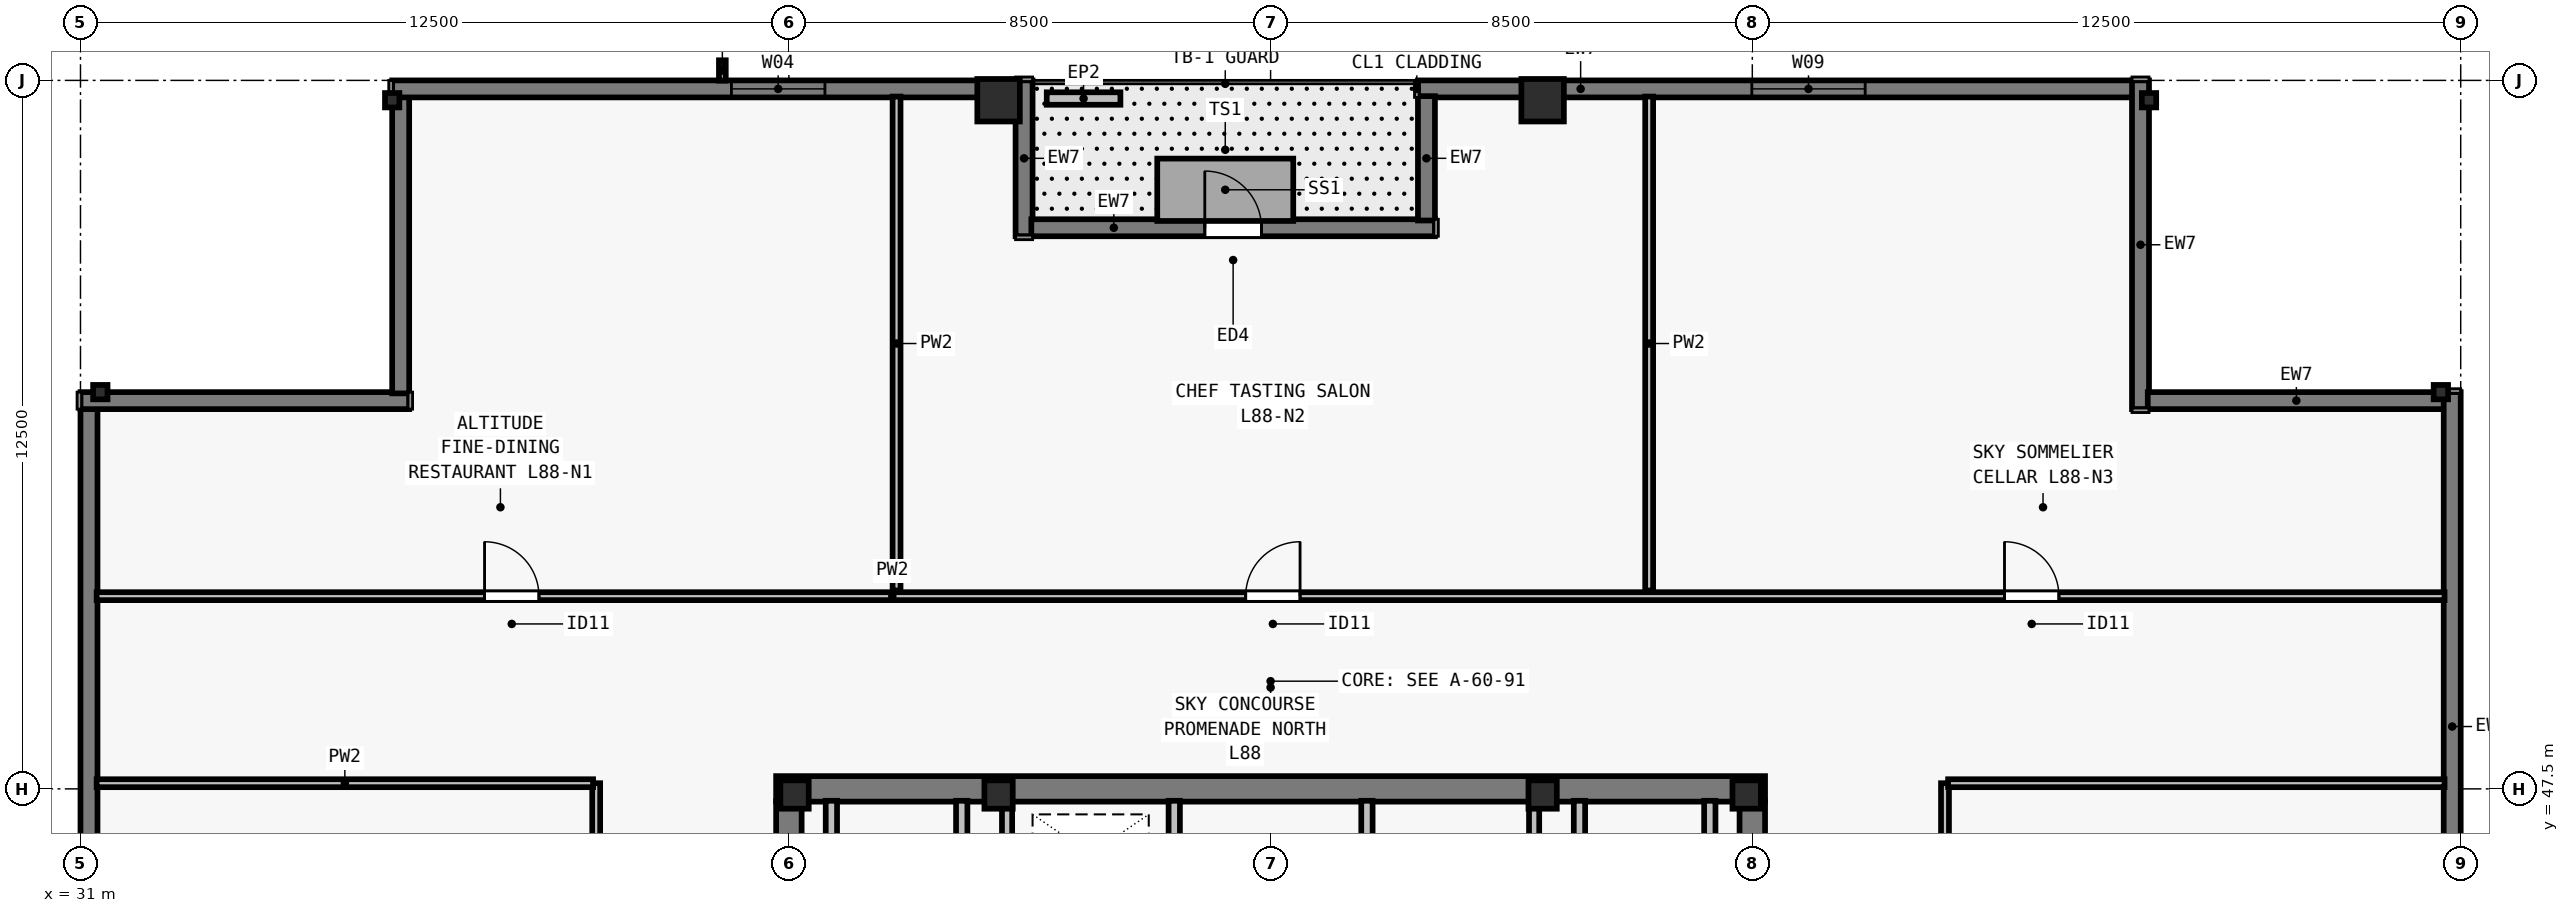
"""IFC4 building model, lengths in metres.
Left out: names, types, materials, properties, quantities, classifications, styles, units other than length and angle.
Written with IfcOpenShell. Run it as: python <this file> out.ifc"""

import sys

from ifc_helpers import new_model, si_unit, direction, frame, frame_2d, origin, origin_2d, place, context, subcontext, project, spatial, rectangle, i_section, extrude, element, fill, save


model = new_model("IFC4")
c1 = context("Model", 3, precision=1e-05, world=origin(), true_north=direction((0.0, 1.0)))
c2 = subcontext(c1, "Body", "Model", "MODEL_VIEW")
j1 = project(units=[si_unit("LENGTHUNIT", "METRE"), si_unit("PLANEANGLEUNIT", "RADIAN")], contexts=[c1])
p1 = place(None, origin())
s1 = spatial("IfcSite", under=j1, at=p1, CompositionType="ELEMENT")
p2 = place(p1, origin())
s2 = spatial("IfcBuilding", under=s1, at=p2, CompositionType="ELEMENT")
p3 = place(p2, frame((0.0, 0.0, 320.0)))
s3 = spatial("IfcBuildingStorey", under=s2, at=p3, CompositionType="ELEMENT", Elevation=320.0)
for number, where, z_axis, x_axis in (
    (1, (43.6, 47.4, 0.0), (0.0, 0.0, 1.0), (1.0, 0.0, 0.0)),
    (2, (47.2, 47.4, 0.0), (0.0, 0.0, 1.0), (1.0, 0.0, 0.0)),
    (3, (56.8, 47.4, 0.0), (0.0, 0.0, 1.0), (1.0, 0.0, 0.0)),
    (4, (60.4, 47.4, 0.0), (0.0, 0.0, 1.0), (1.0, 0.0, 0.0)),
):
    element("IfcColumn", number, at=place(p3, frame(where, z_axis=z_axis, x_axis=x_axis)), inside=s3, PredefinedType="COLUMN", context=c2, shape_type="SweptSolid", body=[
        extrude(i_section(OverallWidth=0.5, OverallDepth=0.5, WebThickness=0.028, FlangeThickness=0.045, at=origin_2d()), origin(), (0.0, 0.0, 1.0), 4.5),
    ])
for number, where, z_axis, x_axis in (
    (5, (72.65, 54.5, 0.0), (0.0, 0.0, 1.0), (0.0, 1.0, 0.0)),
    (6, (67.5, 59.65, 0.0), (0.0, 0.0, 1.0), (1.0, 0.0, 0.0)),
):
    element("IfcColumn", number, at=place(p3, frame(where, z_axis=z_axis, x_axis=x_axis)), inside=s3, PredefinedType="COLUMN", context=c2, shape_type="SweptSolid", body=[
        extrude(i_section(OverallWidth=0.254, OverallDepth=0.254, WebThickness=0.009, FlangeThickness=0.014, FilletRadius=0.013, at=origin_2d()), origin(), (0.0, 0.0, 1.0), 4.5),
    ])
for number, where, z_axis, x_axis in (
    (7, (56.8, 59.65, 0.0), (0.0, 0.0, 1.0), (1.0, 0.0, 0.0)),
    (8, (47.2, 59.65, 0.0), (0.0, 0.0, 1.0), (1.0, 0.0, 0.0)),
):
    element("IfcColumn", number, at=place(p3, frame(where, z_axis=z_axis, x_axis=x_axis)), inside=s3, PredefinedType="COLUMN", context=c2, shape_type="SweptSolid", body=[
        extrude(rectangle(XDim=0.75, YDim=0.75, at=origin_2d()), origin(), (0.0, 0.0, 1.0), 4.5),
    ])
for number, where, z_axis, x_axis in (
    (9, (36.5, 59.65, 0.0), (0.0, 0.0, 1.0), (1.0, 0.0, 0.0)),
    (10, (31.35, 54.5, 0.0), (0.0, 0.0, 1.0), (0.0, 1.0, 0.0)),
):
    element("IfcColumn", number, at=place(p3, frame(where, z_axis=z_axis, x_axis=x_axis)), inside=s3, PredefinedType="COLUMN", context=c2, shape_type="SweptSolid", body=[
        extrude(i_section(OverallWidth=0.254, OverallDepth=0.254, WebThickness=0.009, FlangeThickness=0.014, FilletRadius=0.013, at=origin_2d()), origin(), (0.0, 0.0, 1.0), 4.5),
    ])
p4 = place(p3, frame((54.6, 59.85, 0.0), z_axis=(0.0, 0.0, 1.0), x_axis=(1.0, 0.0, 0.0)))
e11 = element("IfcWall", 11, at=p4, inside=s3, PredefinedType="SOLIDWALL", context=c2, shape_type="SweptSolid", body=[
    extrude(rectangle(XDim=12.622, YDim=0.3, at=frame_2d((6.311, 0.0))), origin(), (0.0, 0.0, 1.0), 4.25),
])
p5 = place(p4, frame((5.892, 0.0, 0.8)))
e12 = element("IfcOpeningElement", 12, at=p5, cuts=e11, PredefinedType="OPENING", context=c2, shape_type="SweptSolid", body=[
    extrude(rectangle(XDim=2.0, YDim=1.53, at=frame_2d((1.0, 0.765))), frame((0.0, 0.16, 0.0), z_axis=(0.0, -1.0, 0.0), x_axis=(1.0, 0.0, 0.0)), (0.0, 0.0, 1.0), 0.32),
])
p6 = place(p3, frame((67.35, 60.0, 0.0), z_axis=(0.0, 0.0, 1.0), x_axis=(0.0, -1.0, 0.0)))
e13 = element("IfcWall", 13, at=p6, inside=s3, PredefinedType="SOLIDWALL", context=c2, shape_type="SweptSolid", body=[
    extrude(rectangle(XDim=5.8, YDim=0.3, at=frame_2d((2.9, 0.0))), origin(), (0.0, 0.0, 1.0), 4.25),
])
p7 = place(p3, frame((67.478, 54.35, 0.0), z_axis=(0.0, 0.0, 1.0), x_axis=(1.0, 0.0, 0.0)))
e14 = element("IfcWall", 14, at=p7, inside=s3, PredefinedType="SOLIDWALL", context=c2, shape_type="SweptSolid", body=[
    extrude(rectangle(XDim=5.244, YDim=0.3, at=frame_2d((2.622, 0.0))), origin(), (0.0, 0.0, 1.0), 4.25),
])
p8 = place(p3, frame((72.85, 54.5, 0.0), z_axis=(0.0, 0.0, 1.0), x_axis=(0.0, -1.0, 0.0)))
e15 = element("IfcWall", 15, at=p8, inside=s3, PredefinedType="SOLIDWALL", context=c2, shape_type="SweptSolid", body=[
    extrude(rectangle(XDim=11.8, YDim=0.3, at=frame_2d((5.9, 0.0))), origin(), (0.0, 0.0, 1.0), 4.25),
])
p9 = place(p3, frame((31.15, 42.7, 0.0), z_axis=(0.0, 0.0, 1.0), x_axis=(0.0, 1.0, 0.0)))
e16 = element("IfcWall", 16, at=p9, inside=s3, PredefinedType="SOLIDWALL", context=c2, shape_type="SweptSolid", body=[
    extrude(rectangle(XDim=11.522, YDim=0.3, at=frame_2d((5.761, 0.0))), origin(), (0.0, 0.0, 1.0), 4.25),
])
p10 = place(p3, frame((31.0, 54.35, 0.0), z_axis=(0.0, 0.0, 1.0), x_axis=(1.0, 0.0, 0.0)))
e17 = element("IfcWall", 17, at=p10, inside=s3, PredefinedType="SOLIDWALL", context=c2, shape_type="SweptSolid", body=[
    extrude(rectangle(XDim=5.8, YDim=0.3, at=frame_2d((2.9, 0.0))), origin(), (0.0, 0.0, 1.0), 4.25),
])
p11 = place(p3, frame((36.65, 54.478, 0.0), z_axis=(0.0, 0.0, 1.0), x_axis=(0.0, 1.0, 0.0)))
e18 = element("IfcWall", 18, at=p11, inside=s3, PredefinedType="SOLIDWALL", context=c2, shape_type="SweptSolid", body=[
    extrude(rectangle(XDim=5.244, YDim=0.3, at=frame_2d((2.622, 0.0))), origin(), (0.0, 0.0, 1.0), 4.25),
])
p12 = place(p3, frame((36.5, 59.85, 0.0), z_axis=(0.0, 0.0, 1.0), x_axis=(1.0, 0.0, 0.0)))
e19 = element("IfcWall", 19, at=p12, inside=s3, PredefinedType="SOLIDWALL", context=c2, shape_type="SweptSolid", body=[
    extrude(rectangle(XDim=11.022, YDim=0.3, at=frame_2d((5.511, 0.0))), origin(), (0.0, 0.0, 1.0), 4.25),
])
p13 = place(p12, frame((5.986, 0.0, 0.8)))
e20 = element("IfcOpeningElement", 20, at=p13, cuts=e19, PredefinedType="OPENING", context=c2, shape_type="SweptSolid", body=[
    extrude(rectangle(XDim=1.65, YDim=1.53, at=frame_2d((0.825, 0.765))), frame((0.0, 0.16, 0.0), z_axis=(0.0, -1.0, 0.0), x_axis=(1.0, 0.0, 0.0)), (0.0, 0.0, 1.0), 0.32),
])
p14 = place(p3, frame((47.65, 60.0, 0.0), z_axis=(0.0, 0.0, 1.0), x_axis=(0.0, -1.0, 0.0)))
e21 = element("IfcWall", 21, at=p14, inside=s3, PredefinedType="SOLIDWALL", context=c2, shape_type="SweptSolid", body=[
    extrude(rectangle(XDim=2.75, YDim=0.3, at=frame_2d((1.375, 0.0))), origin(), (0.0, 0.0, 1.0), 4.25),
])
p15 = place(p3, frame((47.778, 57.4, 0.0), z_axis=(0.0, 0.0, 1.0), x_axis=(1.0, 0.0, 0.0)))
e22 = element("IfcWall", 22, at=p15, inside=s3, PredefinedType="SOLIDWALL", context=c2, shape_type="SweptSolid", body=[
    extrude(rectangle(XDim=7.122, YDim=0.3, at=frame_2d((3.561, 0.0))), origin(), (0.0, 0.0, 1.0), 4.25),
])
p16 = place(p15, frame((3.061, 0.0, 0.0)))
e23 = element("IfcOpeningElement", 23, at=p16, cuts=e22, PredefinedType="OPENING", context=c2, shape_type="SweptSolid", body=[
    extrude(rectangle(XDim=1.0, YDim=2.15, at=frame_2d((0.5, 1.075))), frame((0.0, 0.16, 0.0), z_axis=(0.0, -1.0, 0.0), x_axis=(1.0, 0.0, 0.0)), (0.0, 0.0, 1.0), 0.32),
])
p17 = place(p3, frame((54.75, 57.528, 0.0), z_axis=(0.0, 0.0, 1.0), x_axis=(0.0, 1.0, 0.0)))
e24 = element("IfcWall", 24, at=p17, inside=s3, PredefinedType="SOLIDWALL", context=c2, shape_type="SweptSolid", body=[
    extrude(rectangle(XDim=2.194, YDim=0.3, at=frame_2d((1.097, 0.0))), origin(), (0.0, 0.0, 1.0), 4.25),
])
p18 = place(p3, frame((48.05, 59.68, 0.0), z_axis=(0.0, 0.0, 1.0), x_axis=(1.0, 0.0, 0.0)))
e25 = element("IfcWall", 25, at=p18, inside=s3, PredefinedType="PARAPET", context=c2, shape_type="SweptSolid", body=[
    extrude(rectangle(XDim=1.3, YDim=0.22, at=frame_2d((0.65, 0.0))), origin(), (0.0, 0.0, 1.0), 0.55),
])
p19 = place(p3, frame((43.275, 47.5, 0.0), z_axis=(0.0, 0.0, 1.0), x_axis=(1.0, 0.0, 0.0)))
e26 = element("IfcWall", 26, at=p19, inside=s3, PredefinedType="SHEAR", context=c2, shape_type="SweptSolid", body=[
    extrude(rectangle(XDim=17.45, YDim=0.45, at=frame_2d((8.725, 0.0))), origin(), (0.0, 0.0, 1.0), 4.25),
])
for number, where, z_axis, x_axis in (
    (27, (43.5, 40.8, 0.0), (0.0, 0.0, 1.0), (0.0, 1.0, 0.0)),
    (28, (60.5, 40.8, 0.0), (0.0, 0.0, 1.0), (0.0, 1.0, 0.0)),
):
    element("IfcWall", number, at=place(p3, frame(where, z_axis=z_axis, x_axis=x_axis)), inside=s3, PredefinedType="SHEAR", context=c2, shape_type="SweptSolid", body=[
        extrude(rectangle(XDim=6.485, YDim=0.45, at=frame_2d((3.242, 0.0))), origin(), (0.0, 0.0, 1.0), 4.25),
    ])
p20 = place(p3, frame((50.3, 40.585, 0.0), z_axis=(0.0, 0.0, 1.0), x_axis=(0.0, 1.0, 0.0)))
e29 = element("IfcWall", 29, at=p20, inside=s3, PredefinedType="SOLIDWALL", context=c2, shape_type="SweptSolid", body=[
    extrude(rectangle(XDim=6.705, YDim=0.2, at=frame_2d((3.353, 0.0))), origin(), (0.0, 0.0, 1.0), 4.25),
])
p21 = place(p20, frame((0.515, 0.0, 0.0)))
e30 = element("IfcOpeningElement", 30, at=p21, cuts=e29, PredefinedType="OPENING", context=c2, shape_type="SweptSolid", body=[
    extrude(rectangle(XDim=1.1, YDim=2.2, at=frame_2d((0.55, 1.1))), frame((0.0, 0.11, 0.0), z_axis=(0.0, -1.0, 0.0), x_axis=(1.0, 0.0, 0.0)), (0.0, 0.0, 1.0), 0.22),
])
p22 = place(p20, frame((3.015, 0.0, 0.0)))
e31 = element("IfcOpeningElement", 31, at=p22, cuts=e29, PredefinedType="OPENING", context=c2, shape_type="SweptSolid", body=[
    extrude(rectangle(XDim=1.1, YDim=2.2, at=frame_2d((0.55, 1.1))), frame((0.0, 0.11, 0.0), z_axis=(0.0, -1.0, 0.0), x_axis=(1.0, 0.0, 0.0)), (0.0, 0.0, 1.0), 0.22),
])
p23 = place(p20, frame((5.065, 0.0, 0.0)))
e32 = element("IfcOpeningElement", 32, at=p23, cuts=e29, PredefinedType="OPENING", context=c2, shape_type="SweptSolid", body=[
    extrude(rectangle(XDim=0.8, YDim=2.08, at=frame_2d((0.4, 1.04))), frame((0.0, 0.11, 0.0), z_axis=(0.0, -1.0, 0.0), x_axis=(1.0, 0.0, 0.0)), (0.0, 0.0, 1.0), 0.22),
])
p24 = place(p3, frame((53.7, 40.585, 0.0), z_axis=(0.0, 0.0, 1.0), x_axis=(0.0, 1.0, 0.0)))
e33 = element("IfcWall", 33, at=p24, inside=s3, PredefinedType="SOLIDWALL", context=c2, shape_type="SweptSolid", body=[
    extrude(rectangle(XDim=6.705, YDim=0.2, at=frame_2d((3.353, 0.0))), origin(), (0.0, 0.0, 1.0), 4.25),
])
p25 = place(p24, frame((0.195, 0.0, 0.0)))
e34 = element("IfcOpeningElement", 34, at=p25, cuts=e33, PredefinedType="OPENING", context=c2, shape_type="SweptSolid", body=[
    extrude(rectangle(XDim=0.8, YDim=2.08, at=frame_2d((0.4, 1.04))), frame((0.0, 0.11, 0.0), z_axis=(0.0, -1.0, 0.0), x_axis=(1.0, 0.0, 0.0)), (0.0, 0.0, 1.0), 0.22),
])
p26 = place(p24, frame((1.865, 0.0, 0.0)))
e35 = element("IfcOpeningElement", 35, at=p26, cuts=e33, PredefinedType="OPENING", context=c2, shape_type="SweptSolid", body=[
    extrude(rectangle(XDim=1.1, YDim=2.2, at=frame_2d((0.55, 1.1))), frame((0.0, 0.11, 0.0), z_axis=(0.0, -1.0, 0.0), x_axis=(1.0, 0.0, 0.0)), (0.0, 0.0, 1.0), 0.22),
])
p27 = place(p24, frame((4.265, 0.0, 0.0)))
e36 = element("IfcOpeningElement", 36, at=p27, cuts=e33, PredefinedType="OPENING", context=c2, shape_type="SweptSolid", body=[
    extrude(rectangle(XDim=0.95, YDim=2.12, at=frame_2d((0.475, 1.06))), frame((0.0, 0.11, 0.0), z_axis=(0.0, -1.0, 0.0), x_axis=(1.0, 0.0, 0.0)), (0.0, 0.0, 1.0), 0.22),
])
for number, where, z_axis, x_axis in (
    (37, (46.55, 43.735, 0.0), (0.0, 0.0, 1.0), (0.0, 1.0, 0.0)),
    (38, (44.25, 43.735, 0.0), (0.0, 0.0, 1.0), (0.0, 1.0, 0.0)),
    (39, (57.45, 43.735, 0.0), (0.0, 0.0, 1.0), (0.0, 1.0, 0.0)),
    (40, (59.75, 43.735, 0.0), (0.0, 0.0, 1.0), (0.0, 1.0, 0.0)),
):
    element("IfcWall", number, at=place(p3, frame(where, z_axis=z_axis, x_axis=x_axis)), inside=s3, PredefinedType="SOLIDWALL", context=c2, shape_type="SweptSolid", body=[
        extrude(rectangle(XDim=3.555, YDim=0.2, at=frame_2d((1.777, 0.0))), origin(), (0.0, 0.0, 1.0), 4.25),
    ])
for number, where, z_axis, x_axis in (
    (41, (47.35, 43.735, 0.0), (0.0, 0.0, 1.0), (0.0, 1.0, 0.0)),
    (42, (56.65, 43.735, 0.0), (0.0, 0.0, 1.0), (0.0, 1.0, 0.0)),
):
    element("IfcWall", number, at=place(p3, frame(where, z_axis=z_axis, x_axis=x_axis)), inside=s3, PredefinedType="SOLIDWALL", context=c2, shape_type="SweptSolid", body=[
        extrude(rectangle(XDim=3.555, YDim=0.18, at=frame_2d((1.777, 0.0))), origin(), (0.0, 0.0, 1.0), 4.25),
    ])
p28 = place(p3, frame((31.285, 50.9, 0.0), z_axis=(0.0, 0.0, 1.0), x_axis=(1.0, 0.0, 0.0)))
e43 = element("IfcWall", 43, at=p28, inside=s3, PredefinedType="PARTITIONING", context=c2, shape_type="SweptSolid", body=[
    extrude(rectangle(XDim=41.43, YDim=0.14, at=frame_2d((20.715, 0.0))), origin(), (0.0, 0.0, 1.0), 3.969),
])
p29 = place(p28, frame((6.845, 0.0, 0.0)))
e44 = element("IfcOpeningElement", 44, at=p29, cuts=e43, PredefinedType="OPENING", context=c2, shape_type="SweptSolid", body=[
    extrude(rectangle(XDim=0.96, YDim=2.12, at=frame_2d((0.48, 1.06))), frame((0.0, 0.08, 0.0), z_axis=(0.0, -1.0, 0.0), x_axis=(1.0, 0.0, 0.0)), (0.0, 0.0, 1.0), 0.16),
])
p30 = place(p28, frame((20.275, 0.0, 0.0)))
e45 = element("IfcOpeningElement", 45, at=p30, cuts=e43, PredefinedType="OPENING", context=c2, shape_type="SweptSolid", body=[
    extrude(rectangle(XDim=0.96, YDim=2.12, at=frame_2d((0.48, 1.06))), frame((0.0, 0.08, 0.0), z_axis=(0.0, -1.0, 0.0), x_axis=(1.0, 0.0, 0.0)), (0.0, 0.0, 1.0), 0.16),
])
p31 = place(p28, frame((33.665, 0.0, 0.0)))
e46 = element("IfcOpeningElement", 46, at=p31, cuts=e43, PredefinedType="OPENING", context=c2, shape_type="SweptSolid", body=[
    extrude(rectangle(XDim=0.96, YDim=2.12, at=frame_2d((0.48, 1.06))), frame((0.0, 0.08, 0.0), z_axis=(0.0, -1.0, 0.0), x_axis=(1.0, 0.0, 0.0)), (0.0, 0.0, 1.0), 0.16),
])
p32 = place(p3, frame((40.1, 30.4, 0.0), z_axis=(0.0, 0.0, 1.0), x_axis=(0.0, 1.0, 0.0)))
e47 = element("IfcWall", 47, at=p32, inside=s3, PredefinedType="PARTITIONING", context=c2, shape_type="SweptSolid", body=[
    extrude(rectangle(XDim=17.2, YDim=0.14, at=frame_2d((8.6, 0.0))), origin(), (0.0, 0.0, 1.0), 3.969),
])
p33 = place(p32, frame((3.772, 0.0, 0.0)))
e48 = element("IfcOpeningElement", 48, at=p33, cuts=e47, PredefinedType="OPENING", context=c2, shape_type="SweptSolid", body=[
    extrude(rectangle(XDim=0.96, YDim=2.12, at=frame_2d((0.48, 1.06))), frame((0.0, 0.08, 0.0), z_axis=(0.0, -1.0, 0.0), x_axis=(1.0, 0.0, 0.0)), (0.0, 0.0, 1.0), 0.16),
])
p34 = place(p32, frame((12.272, 0.0, 0.0)))
e49 = element("IfcOpeningElement", 49, at=p34, cuts=e47, PredefinedType="OPENING", context=c2, shape_type="SweptSolid", body=[
    extrude(rectangle(XDim=0.96, YDim=2.12, at=frame_2d((0.48, 1.06))), frame((0.0, 0.08, 0.0), z_axis=(0.0, -1.0, 0.0), x_axis=(1.0, 0.0, 0.0)), (0.0, 0.0, 1.0), 0.16),
])
p35 = place(p3, frame((63.9, 30.4, 0.0), z_axis=(0.0, 0.0, 1.0), x_axis=(0.0, 1.0, 0.0)))
e50 = element("IfcWall", 50, at=p35, inside=s3, PredefinedType="PARTITIONING", context=c2, shape_type="SweptSolid", body=[
    extrude(rectangle(XDim=17.2, YDim=0.14, at=frame_2d((8.6, 0.0))), origin(), (0.0, 0.0, 1.0), 4.25),
])
p36 = place(p35, frame((3.968, 0.0, 0.0)))
e51 = element("IfcOpeningElement", 51, at=p36, cuts=e50, PredefinedType="OPENING", context=c2, shape_type="SweptSolid", body=[
    extrude(rectangle(XDim=0.96, YDim=2.12, at=frame_2d((0.48, 1.06))), frame((0.0, 0.08, 0.0), z_axis=(0.0, -1.0, 0.0), x_axis=(1.0, 0.0, 0.0)), (0.0, 0.0, 1.0), 0.16),
])
p37 = place(p35, frame((12.468, 0.0, 0.0)))
e52 = element("IfcOpeningElement", 52, at=p37, cuts=e50, PredefinedType="OPENING", context=c2, shape_type="SweptSolid", body=[
    extrude(rectangle(XDim=0.96, YDim=2.12, at=frame_2d((0.48, 1.06))), frame((0.0, 0.08, 0.0), z_axis=(0.0, -1.0, 0.0), x_axis=(1.0, 0.0, 0.0)), (0.0, 0.0, 1.0), 0.16),
])
for number, where, z_axis, x_axis in (
    (53, (31.285, 47.6, 0.0), (0.0, 0.0, 1.0), (1.0, 0.0, 0.0)),
    (54, (63.955, 47.6, 0.0), (0.0, 0.0, 1.0), (1.0, 0.0, 0.0)),
):
    element("IfcWall", number, at=place(p3, frame(where, z_axis=z_axis, x_axis=x_axis)), inside=s3, PredefinedType="PARTITIONING", context=c2, shape_type="SweptSolid", body=[
        extrude(rectangle(XDim=8.76, YDim=0.14, at=frame_2d((4.38, 0.0))), origin(), (0.0, 0.0, 1.0), 2.425),
    ])
for number, where, z_axis, x_axis in (
    (55, (45.4, 51.0, 0.0), (0.0, 0.0, 1.0), (0.0, 1.0, 0.0)),
    (56, (58.68, 51.0, 0.0), (0.0, 0.0, 1.0), (0.0, 1.0, 0.0)),
):
    element("IfcWall", number, at=place(p3, frame(where, z_axis=z_axis, x_axis=x_axis)), inside=s3, PredefinedType="PARTITIONING", context=c2, shape_type="SweptSolid", body=[
        extrude(rectangle(XDim=8.715, YDim=0.14, at=frame_2d((4.357, 0.0))), origin(), (0.0, 0.0, 1.0), 4.25),
    ])
p38 = place(p5, origin())
e57 = element("IfcWindow", 57, at=p38, inside=s3, PartitioningType="SINGLE_PANEL", PredefinedType="WINDOW", context=c2, shape_type="SweptSolid", body=[
    extrude(rectangle(XDim=2.0, YDim=1.53, at=frame_2d((1.0, 0.765))), frame((0.0, -0.05, 0.0), z_axis=(0.0, -1.0, 0.0), x_axis=(1.0, 0.0, 0.0)), (0.0, 0.0, 1.0), 0.06),
])
fill(e12, e57)
p39 = place(p13, origin())
e58 = element("IfcWindow", 58, at=p39, inside=s3, PartitioningType="SINGLE_PANEL", PredefinedType="WINDOW", context=c2, shape_type="SweptSolid", body=[
    extrude(rectangle(XDim=1.65, YDim=1.53, at=frame_2d((0.825, 0.765))), frame((0.0, -0.05, 0.0), z_axis=(0.0, -1.0, 0.0), x_axis=(1.0, 0.0, 0.0)), (0.0, 0.0, 1.0), 0.06),
])
fill(e20, e58)
p40 = place(p16, origin())
e59 = element("IfcDoor", 59, at=p40, inside=s3, OperationType="SINGLE_SWING_LEFT", PredefinedType="DOOR", context=c2, shape_type="SweptSolid", body=[
    extrude(rectangle(XDim=1.0, YDim=2.15, at=frame_2d((0.5, 1.075))), frame((0.0, 0.025, 0.0), z_axis=(0.0, -1.0, 0.0), x_axis=(1.0, 0.0, 0.0)), (0.0, 0.0, 1.0), 0.05),
])
fill(e23, e59)
p41 = place(p29, origin())
e60 = element("IfcDoor", 60, at=p41, inside=s3, OperationType="SINGLE_SWING_LEFT", PredefinedType="DOOR", context=c2, shape_type="SweptSolid", body=[
    extrude(rectangle(XDim=0.96, YDim=2.12, at=frame_2d((0.48, 1.06))), frame((0.0, 0.025, 0.0), z_axis=(0.0, -1.0, 0.0), x_axis=(1.0, 0.0, 0.0)), (0.0, 0.0, 1.0), 0.05),
])
fill(e44, e60)
p42 = place(p30, origin())
e61 = element("IfcDoor", 61, at=p42, inside=s3, OperationType="SINGLE_SWING_RIGHT", PredefinedType="DOOR", context=c2, shape_type="SweptSolid", body=[
    extrude(rectangle(XDim=0.96, YDim=2.12, at=frame_2d((0.48, 1.06))), frame((0.0, 0.025, 0.0), z_axis=(0.0, -1.0, 0.0), x_axis=(1.0, 0.0, 0.0)), (0.0, 0.0, 1.0), 0.05),
])
fill(e45, e61)
p43 = place(p31, origin())
e62 = element("IfcDoor", 62, at=p43, inside=s3, OperationType="SINGLE_SWING_LEFT", PredefinedType="DOOR", context=c2, shape_type="SweptSolid", body=[
    extrude(rectangle(XDim=0.96, YDim=2.12, at=frame_2d((0.48, 1.06))), frame((0.0, 0.025, 0.0), z_axis=(0.0, -1.0, 0.0), x_axis=(1.0, 0.0, 0.0)), (0.0, 0.0, 1.0), 0.05),
])
fill(e46, e62)
save(model, sys.argv[1])
